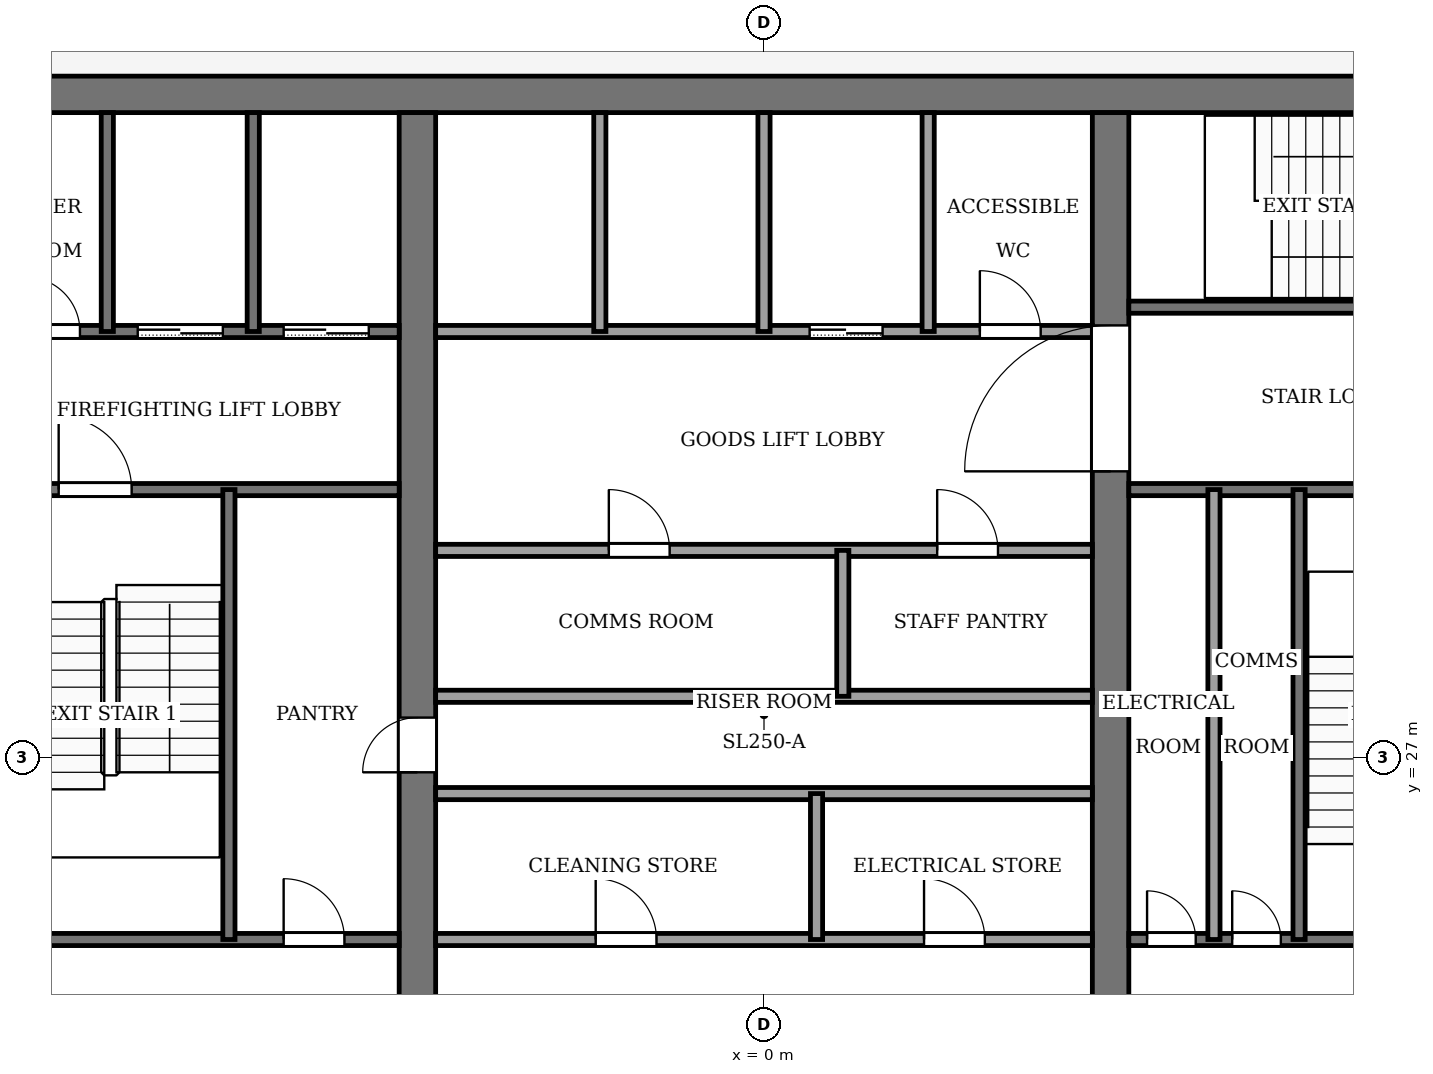
"""IFC4 building model, lengths in metres.
Left out: names, types, materials, properties, quantities, classifications, styles, units other than length and angle.
Written with IfcOpenShell. Run it as: python <this file> out.ifc"""

import sys

from ifc_helpers import new_model, si_unit, direction, frame, frame_2d, origin, place, context, subcontext, project, spatial, rectangle, extrude, element, fill, save


model = new_model("IFC4")
c1 = context("Model", 3, precision=1e-05, world=origin(), true_north=direction((0.0, 1.0)))
c2 = subcontext(c1, "Body", "Model", "MODEL_VIEW")
j1 = project(units=[si_unit("LENGTHUNIT", "METRE"), si_unit("PLANEANGLEUNIT", "RADIAN")], contexts=[c1])
p1 = place(None, origin())
s1 = spatial("IfcSite", under=j1, at=p1, CompositionType="ELEMENT")
p2 = place(p1, origin())
s2 = spatial("IfcBuilding", under=s1, at=p2, CompositionType="ELEMENT")
p3 = place(p2, frame((0.0, 0.0, 294.0)))
s3 = spatial("IfcBuildingStorey", under=s2, at=p3, CompositionType="ELEMENT", Elevation=294.0)
p4 = place(p3, frame((-13.2, 37.9, -0.13), z_axis=(0.0, 0.0, 1.0), x_axis=(1.0, 0.0, 0.0)))
e1 = element("IfcWall", 1, at=p4, inside=s3, PredefinedType="SHEAR", context=c2, shape_type="SweptSolid", body=[
    extrude(rectangle(XDim=26.4, YDim=0.6, at=frame_2d((13.2, 0.0))), origin(), (0.0, 0.0, 1.0), 4.0),
])
p5 = place(p3, frame((-5.7, 18.4, -0.13), z_axis=(0.0, 0.0, 1.0), x_axis=(0.0, 1.0, 0.0)))
e2 = element("IfcWall", 2, at=p5, inside=s3, PredefinedType="SHEAR", context=c2, shape_type="SweptSolid", body=[
    extrude(rectangle(XDim=19.2, YDim=0.6, at=frame_2d((9.6, 0.0))), origin(), (0.0, 0.0, 1.0), 4.0),
])
p6 = place(p5, frame((8.35, 0.0, 0.13)))
e3 = element("IfcOpeningElement", 3, at=p6, cuts=e2, PredefinedType="OPENING", context=c2, shape_type="SweptSolid", body=[
    extrude(rectangle(XDim=0.9, YDim=2.1, at=frame_2d((0.45, 1.05))), frame((0.0, 0.31, 0.0), z_axis=(0.0, -1.0, 0.0), x_axis=(1.0, 0.0, 0.0)), (0.0, 0.0, 1.0), 0.62),
])
p7 = place(p3, frame((5.7, 18.4, -0.13), z_axis=(0.0, 0.0, 1.0), x_axis=(0.0, 1.0, 0.0)))
e4 = element("IfcWall", 4, at=p7, inside=s3, PredefinedType="SHEAR", context=c2, shape_type="SweptSolid", body=[
    extrude(rectangle(XDim=19.2, YDim=0.6, at=frame_2d((9.6, 0.0))), origin(), (0.0, 0.0, 1.0), 4.0),
])
p8 = place(p7, frame((13.3, 0.0, 0.13)))
e5 = element("IfcOpeningElement", 5, at=p8, cuts=e4, PredefinedType="OPENING", context=c2, shape_type="SweptSolid", body=[
    extrude(rectangle(XDim=2.4, YDim=2.4, at=frame_2d((1.2, 1.2))), frame((0.0, 0.31, 0.0), z_axis=(0.0, -1.0, 0.0), x_axis=(1.0, 0.0, 0.0)), (0.0, 0.0, 1.0), 0.62),
])
p9 = place(p3, frame((-12.6, 24.0, 0.0), z_axis=(0.0, 0.0, 1.0), x_axis=(1.0, 0.0, 0.0)))
e6 = element("IfcWall", 6, at=p9, inside=s3, PredefinedType="PARTITIONING", context=c2, shape_type="SweptSolid", body=[
    extrude(rectangle(XDim=6.6, YDim=0.2, at=frame_2d((3.3, 0.0))), origin(), (0.0, 0.0, 1.0), 3.87),
])
p10 = place(p9, frame((4.7, 0.0, 0.0)))
e7 = element("IfcOpeningElement", 7, at=p10, cuts=e6, PredefinedType="OPENING", context=c2, shape_type="SweptSolid", body=[
    extrude(rectangle(XDim=1.0, YDim=2.1, at=frame_2d((0.5, 1.05))), frame((0.0, 0.11, 0.0), z_axis=(0.0, -1.0, 0.0), x_axis=(1.0, 0.0, 0.0)), (0.0, 0.0, 1.0), 0.22),
])
p11 = place(p3, frame((-5.4, 24.0, 0.0), z_axis=(0.0, 0.0, 1.0), x_axis=(1.0, 0.0, 0.0)))
e8 = element("IfcWall", 8, at=p11, inside=s3, PredefinedType="PARTITIONING", context=c2, shape_type="SweptSolid", body=[
    extrude(rectangle(XDim=10.8, YDim=0.2, at=frame_2d((5.4, 0.0))), origin(), (0.0, 0.0, 1.0), 3.87),
])
p12 = place(p11, frame((2.632, 0.0, 0.0)))
e9 = element("IfcOpeningElement", 9, at=p12, cuts=e8, PredefinedType="OPENING", context=c2, shape_type="SweptSolid", body=[
    extrude(rectangle(XDim=1.0, YDim=2.1, at=frame_2d((0.5, 1.05))), frame((0.0, 0.11, 0.0), z_axis=(0.0, -1.0, 0.0), x_axis=(1.0, 0.0, 0.0)), (0.0, 0.0, 1.0), 0.22),
])
p13 = place(p11, frame((8.032, 0.0, 0.0)))
e10 = element("IfcOpeningElement", 10, at=p13, cuts=e8, PredefinedType="OPENING", context=c2, shape_type="SweptSolid", body=[
    extrude(rectangle(XDim=1.0, YDim=2.1, at=frame_2d((0.5, 1.05))), frame((0.0, 0.11, 0.0), z_axis=(0.0, -1.0, 0.0), x_axis=(1.0, 0.0, 0.0)), (0.0, 0.0, 1.0), 0.22),
])
p14 = place(p3, frame((6.0, 24.0, 0.0), z_axis=(0.0, 0.0, 1.0), x_axis=(1.0, 0.0, 0.0)))
e11 = element("IfcWall", 11, at=p14, inside=s3, PredefinedType="PARTITIONING", context=c2, shape_type="SweptSolid", body=[
    extrude(rectangle(XDim=6.6, YDim=0.2, at=frame_2d((3.3, 0.0))), origin(), (0.0, 0.0, 1.0), 3.87),
])
p15 = place(p14, frame((0.3, 0.0, 0.0)))
e12 = element("IfcOpeningElement", 12, at=p15, cuts=e11, PredefinedType="OPENING", context=c2, shape_type="SweptSolid", body=[
    extrude(rectangle(XDim=0.8, YDim=2.1, at=frame_2d((0.4, 1.05))), frame((0.0, 0.11, 0.0), z_axis=(0.0, -1.0, 0.0), x_axis=(1.0, 0.0, 0.0)), (0.0, 0.0, 1.0), 0.22),
])
p16 = place(p14, frame((1.7, 0.0, 0.0)))
e13 = element("IfcOpeningElement", 13, at=p16, cuts=e11, PredefinedType="OPENING", context=c2, shape_type="SweptSolid", body=[
    extrude(rectangle(XDim=0.8, YDim=2.1, at=frame_2d((0.4, 1.05))), frame((0.0, 0.11, 0.0), z_axis=(0.0, -1.0, 0.0), x_axis=(1.0, 0.0, 0.0)), (0.0, 0.0, 1.0), 0.22),
])
p17 = place(p14, frame((4.4, 0.0, 0.0)))
e14 = element("IfcOpeningElement", 14, at=p17, cuts=e11, PredefinedType="OPENING", context=c2, shape_type="SweptSolid", body=[
    extrude(rectangle(XDim=1.2, YDim=2.2, at=frame_2d((0.6, 1.1))), frame((0.0, 0.11, 0.0), z_axis=(0.0, -1.0, 0.0), x_axis=(1.0, 0.0, 0.0)), (0.0, 0.0, 1.0), 0.22),
])
for number, where, z_axis, x_axis in (
    (15, (-5.4, 26.4, 0.0), (0.0, 0.0, 1.0), (1.0, 0.0, 0.0)),
    (16, (-5.4, 28.0, 0.0), (0.0, 0.0, 1.0), (1.0, 0.0, 0.0)),
):
    element("IfcWall", number, at=place(p3, frame(where, z_axis=z_axis, x_axis=x_axis)), inside=s3, PredefinedType="PARTITIONING", context=c2, shape_type="SweptSolid", body=[
        extrude(rectangle(XDim=10.8, YDim=0.2, at=frame_2d((5.4, 0.0))), origin(), (0.0, 0.0, 1.0), 3.87),
    ])
p18 = place(p3, frame((-5.4, 30.4, 0.0), z_axis=(0.0, 0.0, 1.0), x_axis=(1.0, 0.0, 0.0)))
e17 = element("IfcWall", 17, at=p18, inside=s3, PredefinedType="PARTITIONING", context=c2, shape_type="SweptSolid", body=[
    extrude(rectangle(XDim=10.8, YDim=0.2, at=frame_2d((5.4, 0.0))), origin(), (0.0, 0.0, 1.0), 3.87),
])
p19 = place(p18, frame((2.848, 0.0, 0.0)))
e18 = element("IfcOpeningElement", 18, at=p19, cuts=e17, PredefinedType="OPENING", context=c2, shape_type="SweptSolid", body=[
    extrude(rectangle(XDim=1.0, YDim=2.1, at=frame_2d((0.5, 1.05))), frame((0.0, 0.11, 0.0), z_axis=(0.0, -1.0, 0.0), x_axis=(1.0, 0.0, 0.0)), (0.0, 0.0, 1.0), 0.22),
])
p20 = place(p18, frame((8.248, 0.0, 0.0)))
e19 = element("IfcOpeningElement", 19, at=p20, cuts=e17, PredefinedType="OPENING", context=c2, shape_type="SweptSolid", body=[
    extrude(rectangle(XDim=1.0, YDim=2.1, at=frame_2d((0.5, 1.05))), frame((0.0, 0.11, 0.0), z_axis=(0.0, -1.0, 0.0), x_axis=(1.0, 0.0, 0.0)), (0.0, 0.0, 1.0), 0.22),
])
p21 = place(p3, frame((-12.6, 31.4, 0.0), z_axis=(0.0, 0.0, 1.0), x_axis=(1.0, 0.0, 0.0)))
e20 = element("IfcWall", 20, at=p21, inside=s3, PredefinedType="PARTITIONING", context=c2, shape_type="SweptSolid", body=[
    extrude(rectangle(XDim=6.6, YDim=0.2, at=frame_2d((3.3, 0.0))), origin(), (0.0, 0.0, 1.0), 3.87),
])
p22 = place(p21, frame((1.0, 0.0, 0.0)))
e21 = element("IfcOpeningElement", 21, at=p22, cuts=e20, PredefinedType="OPENING", context=c2, shape_type="SweptSolid", body=[
    extrude(rectangle(XDim=1.2, YDim=2.2, at=frame_2d((0.6, 1.1))), frame((0.0, 0.11, 0.0), z_axis=(0.0, -1.0, 0.0), x_axis=(1.0, 0.0, 0.0)), (0.0, 0.0, 1.0), 0.22),
])
p23 = place(p3, frame((6.0, 31.4, 0.0), z_axis=(0.0, 0.0, 1.0), x_axis=(1.0, 0.0, 0.0)))
e22 = element("IfcWall", 22, at=p23, inside=s3, PredefinedType="PARTITIONING", context=c2, shape_type="SweptSolid", body=[
    extrude(rectangle(XDim=6.6, YDim=0.2, at=frame_2d((3.3, 0.0))), origin(), (0.0, 0.0, 1.0), 3.87),
])
p24 = place(p3, frame((-12.6, 34.0, 0.0), z_axis=(0.0, 0.0, 1.0), x_axis=(1.0, 0.0, 0.0)))
e23 = element("IfcWall", 23, at=p24, inside=s3, PredefinedType="PARTITIONING", context=c2, shape_type="SweptSolid", body=[
    extrude(rectangle(XDim=6.6, YDim=0.2, at=frame_2d((3.3, 0.0))), origin(), (0.0, 0.0, 1.0), 3.87),
])
p25 = place(p24, frame((4.7, 0.0, 0.0)))
e24 = element("IfcOpeningElement", 24, at=p25, cuts=e23, PredefinedType="OPENING", context=c2, shape_type="SweptSolid", body=[
    extrude(rectangle(XDim=1.4, YDim=2.2, at=frame_2d((0.7, 1.1))), frame((0.0, 0.11, 0.0), z_axis=(0.0, -1.0, 0.0), x_axis=(1.0, 0.0, 0.0)), (0.0, 0.0, 1.0), 0.22),
])
p26 = place(p24, frame((2.3, 0.0, 0.0)))
e25 = element("IfcOpeningElement", 25, at=p26, cuts=e23, PredefinedType="OPENING", context=c2, shape_type="SweptSolid", body=[
    extrude(rectangle(XDim=1.4, YDim=2.2, at=frame_2d((0.7, 1.1))), frame((0.0, 0.11, 0.0), z_axis=(0.0, -1.0, 0.0), x_axis=(1.0, 0.0, 0.0)), (0.0, 0.0, 1.0), 0.22),
])
p27 = place(p24, frame((0.45, 0.0, 0.0)))
e26 = element("IfcOpeningElement", 26, at=p27, cuts=e23, PredefinedType="OPENING", context=c2, shape_type="SweptSolid", body=[
    extrude(rectangle(XDim=0.9, YDim=2.1, at=frame_2d((0.45, 1.05))), frame((0.0, 0.11, 0.0), z_axis=(0.0, -1.0, 0.0), x_axis=(1.0, 0.0, 0.0)), (0.0, 0.0, 1.0), 0.22),
])
p28 = place(p3, frame((-5.4, 34.0, 0.0), z_axis=(0.0, 0.0, 1.0), x_axis=(1.0, 0.0, 0.0)))
e27 = element("IfcWall", 27, at=p28, inside=s3, PredefinedType="PARTITIONING", context=c2, shape_type="SweptSolid", body=[
    extrude(rectangle(XDim=10.8, YDim=0.2, at=frame_2d((5.4, 0.0))), origin(), (0.0, 0.0, 1.0), 3.87),
])
p29 = place(p28, frame((6.15, 0.0, 0.0)))
e28 = element("IfcOpeningElement", 28, at=p29, cuts=e27, PredefinedType="OPENING", context=c2, shape_type="SweptSolid", body=[
    extrude(rectangle(XDim=1.2, YDim=2.2, at=frame_2d((0.6, 1.1))), frame((0.0, 0.11, 0.0), z_axis=(0.0, -1.0, 0.0), x_axis=(1.0, 0.0, 0.0)), (0.0, 0.0, 1.0), 0.22),
])
p30 = place(p28, frame((8.95, 0.0, 0.0)))
e29 = element("IfcOpeningElement", 29, at=p30, cuts=e27, PredefinedType="OPENING", context=c2, shape_type="SweptSolid", body=[
    extrude(rectangle(XDim=1.0, YDim=2.1, at=frame_2d((0.5, 1.05))), frame((0.0, 0.11, 0.0), z_axis=(0.0, -1.0, 0.0), x_axis=(1.0, 0.0, 0.0)), (0.0, 0.0, 1.0), 0.22),
])
p31 = place(p3, frame((6.0, 34.4, 0.0), z_axis=(0.0, 0.0, 1.0), x_axis=(1.0, 0.0, 0.0)))
e30 = element("IfcWall", 30, at=p31, inside=s3, PredefinedType="PARTITIONING", context=c2, shape_type="SweptSolid", body=[
    extrude(rectangle(XDim=6.6, YDim=0.2, at=frame_2d((3.3, 0.0))), origin(), (0.0, 0.0, 1.0), 3.87),
])
p32 = place(p31, frame((4.8, 0.0, 0.0)))
e31 = element("IfcOpeningElement", 31, at=p32, cuts=e30, PredefinedType="OPENING", context=c2, shape_type="SweptSolid", body=[
    extrude(rectangle(XDim=1.2, YDim=2.2, at=frame_2d((0.6, 1.1))), frame((0.0, 0.11, 0.0), z_axis=(0.0, -1.0, 0.0), x_axis=(1.0, 0.0, 0.0)), (0.0, 0.0, 1.0), 0.22),
])
p33 = place(p3, frame((-10.8, 34.0, 0.0), z_axis=(0.0, 0.0, 1.0), x_axis=(0.0, 1.0, 0.0)))
e32 = element("IfcWall", 32, at=p33, inside=s3, PredefinedType="PARTITIONING", context=c2, shape_type="SweptSolid", body=[
    extrude(rectangle(XDim=3.6, YDim=0.2, at=frame_2d((1.8, 0.0))), origin(), (0.0, 0.0, 1.0), 3.87),
])
p34 = place(p3, frame((-8.8, 24.0, 0.0), z_axis=(0.0, 0.0, 1.0), x_axis=(0.0, 1.0, 0.0)))
e33 = element("IfcWall", 33, at=p34, inside=s3, PredefinedType="PARTITIONING", context=c2, shape_type="SweptSolid", body=[
    extrude(rectangle(XDim=7.4, YDim=0.2, at=frame_2d((3.7, 0.0))), origin(), (0.0, 0.0, 1.0), 3.87),
])
for number, where, z_axis, x_axis in (
    (34, (-8.4, 34.0, 0.0), (0.0, 0.0, 1.0), (0.0, 1.0, 0.0)),
    (35, (-2.7, 34.0, 0.0), (0.0, 0.0, 1.0), (0.0, 1.0, 0.0)),
    (36, (0.0, 34.0, 0.0), (0.0, 0.0, 1.0), (0.0, 1.0, 0.0)),
):
    element("IfcWall", number, at=place(p3, frame(where, z_axis=z_axis, x_axis=x_axis)), inside=s3, PredefinedType="PARTITIONING", context=c2, shape_type="SweptSolid", body=[
        extrude(rectangle(XDim=3.6, YDim=0.2, at=frame_2d((1.8, 0.0))), origin(), (0.0, 0.0, 1.0), 3.87),
    ])
for number, where, z_axis, x_axis in (
    (37, (0.864, 24.0, 0.0), (0.0, 0.0, 1.0), (0.0, 1.0, 0.0)),
    (38, (1.296, 28.0, 0.0), (0.0, 0.0, 1.0), (0.0, 1.0, 0.0)),
):
    element("IfcWall", number, at=place(p3, frame(where, z_axis=z_axis, x_axis=x_axis)), inside=s3, PredefinedType="PARTITIONING", context=c2, shape_type="SweptSolid", body=[
        extrude(rectangle(XDim=2.4, YDim=0.2, at=frame_2d((1.2, 0.0))), origin(), (0.0, 0.0, 1.0), 3.87),
    ])
p35 = place(p3, frame((2.7, 34.0, 0.0), z_axis=(0.0, 0.0, 1.0), x_axis=(0.0, 1.0, 0.0)))
e39 = element("IfcWall", 39, at=p35, inside=s3, PredefinedType="PARTITIONING", context=c2, shape_type="SweptSolid", body=[
    extrude(rectangle(XDim=3.6, YDim=0.2, at=frame_2d((1.8, 0.0))), origin(), (0.0, 0.0, 1.0), 3.87),
])
for number, where, z_axis, x_axis in (
    (40, (7.4, 24.0, 0.0), (0.0, 0.0, 1.0), (0.0, 1.0, 0.0)),
    (41, (8.8, 24.0, 0.0), (0.0, 0.0, 1.0), (0.0, 1.0, 0.0)),
):
    element("IfcWall", number, at=place(p3, frame(where, z_axis=z_axis, x_axis=x_axis)), inside=s3, PredefinedType="PARTITIONING", context=c2, shape_type="SweptSolid", body=[
        extrude(rectangle(XDim=7.4, YDim=0.2, at=frame_2d((3.7, 0.0))), origin(), (0.0, 0.0, 1.0), 3.87),
    ])
p36 = place(p29, origin())
e42 = element("IfcDoor", 42, at=p36, inside=s3, OperationType="SLIDING_TO_LEFT", PredefinedType="DOOR", context=c2, shape_type="SweptSolid", body=[
    extrude(rectangle(XDim=1.2, YDim=2.2, at=frame_2d((0.6, 1.1))), frame((0.0, 0.025, 0.0), z_axis=(0.0, -1.0, 0.0), x_axis=(1.0, 0.0, 0.0)), (0.0, 0.0, 1.0), 0.05),
])
fill(e28, e42)
p37 = place(p25, origin())
e43 = element("IfcDoor", 43, at=p37, inside=s3, OperationType="SLIDING_TO_LEFT", PredefinedType="DOOR", context=c2, shape_type="SweptSolid", body=[
    extrude(rectangle(XDim=1.4, YDim=2.2, at=frame_2d((0.7, 1.1))), frame((0.0, 0.025, 0.0), z_axis=(0.0, -1.0, 0.0), x_axis=(1.0, 0.0, 0.0)), (0.0, 0.0, 1.0), 0.05),
])
fill(e24, e43)
p38 = place(p26, origin())
e44 = element("IfcDoor", 44, at=p38, inside=s3, OperationType="SLIDING_TO_LEFT", PredefinedType="DOOR", context=c2, shape_type="SweptSolid", body=[
    extrude(rectangle(XDim=1.4, YDim=2.2, at=frame_2d((0.7, 1.1))), frame((0.0, 0.025, 0.0), z_axis=(0.0, -1.0, 0.0), x_axis=(1.0, 0.0, 0.0)), (0.0, 0.0, 1.0), 0.05),
])
fill(e25, e44)
p39 = place(p27, origin())
e45 = element("IfcDoor", 45, at=p39, inside=s3, OperationType="SINGLE_SWING_RIGHT", PredefinedType="DOOR", context=c2, shape_type="SweptSolid", body=[
    extrude(rectangle(XDim=0.9, YDim=2.1, at=frame_2d((0.45, 1.05))), frame((0.0, 0.025, 0.0), z_axis=(0.0, -1.0, 0.0), x_axis=(1.0, 0.0, 0.0)), (0.0, 0.0, 1.0), 0.05),
])
fill(e26, e45)
p40 = place(p12, origin())
e46 = element("IfcDoor", 46, at=p40, inside=s3, OperationType="SINGLE_SWING_LEFT", PredefinedType="DOOR", context=c2, shape_type="SweptSolid", body=[
    extrude(rectangle(XDim=1.0, YDim=2.1, at=frame_2d((0.5, 1.05))), frame((0.0, 0.025, 0.0), z_axis=(0.0, -1.0, 0.0), x_axis=(1.0, 0.0, 0.0)), (0.0, 0.0, 1.0), 0.05),
])
fill(e9, e46)
p41 = place(p13, origin())
e47 = element("IfcDoor", 47, at=p41, inside=s3, OperationType="SINGLE_SWING_RIGHT", PredefinedType="DOOR", context=c2, shape_type="SweptSolid", body=[
    extrude(rectangle(XDim=1.0, YDim=2.1, at=frame_2d((0.5, 1.05))), frame((0.0, 0.025, 0.0), z_axis=(0.0, -1.0, 0.0), x_axis=(1.0, 0.0, 0.0)), (0.0, 0.0, 1.0), 0.05),
])
fill(e10, e47)
p42 = place(p19, origin())
e48 = element("IfcDoor", 48, at=p42, inside=s3, OperationType="SINGLE_SWING_LEFT", PredefinedType="DOOR", context=c2, shape_type="SweptSolid", body=[
    extrude(rectangle(XDim=1.0, YDim=2.1, at=frame_2d((0.5, 1.05))), frame((0.0, 0.025, 0.0), z_axis=(0.0, -1.0, 0.0), x_axis=(1.0, 0.0, 0.0)), (0.0, 0.0, 1.0), 0.05),
])
fill(e18, e48)
p43 = place(p20, origin())
e49 = element("IfcDoor", 49, at=p43, inside=s3, OperationType="SINGLE_SWING_RIGHT", PredefinedType="DOOR", context=c2, shape_type="SweptSolid", body=[
    extrude(rectangle(XDim=1.0, YDim=2.1, at=frame_2d((0.5, 1.05))), frame((0.0, 0.025, 0.0), z_axis=(0.0, -1.0, 0.0), x_axis=(1.0, 0.0, 0.0)), (0.0, 0.0, 1.0), 0.05),
])
fill(e19, e49)
p44 = place(p10, origin())
e50 = element("IfcDoor", 50, at=p44, inside=s3, OperationType="SINGLE_SWING_RIGHT", PredefinedType="DOOR", context=c2, shape_type="SweptSolid", body=[
    extrude(rectangle(XDim=1.0, YDim=2.1, at=frame_2d((0.5, 1.05))), frame((0.0, 0.025, 0.0), z_axis=(0.0, -1.0, 0.0), x_axis=(1.0, 0.0, 0.0)), (0.0, 0.0, 1.0), 0.05),
])
fill(e7, e50)
p45 = place(p15, origin())
e51 = element("IfcDoor", 51, at=p45, inside=s3, OperationType="SINGLE_SWING_RIGHT", PredefinedType="DOOR", context=c2, shape_type="SweptSolid", body=[
    extrude(rectangle(XDim=0.8, YDim=2.1, at=frame_2d((0.4, 1.05))), frame((0.0, 0.025, 0.0), z_axis=(0.0, -1.0, 0.0), x_axis=(1.0, 0.0, 0.0)), (0.0, 0.0, 1.0), 0.05),
])
fill(e12, e51)
p46 = place(p16, origin())
e52 = element("IfcDoor", 52, at=p46, inside=s3, OperationType="SINGLE_SWING_LEFT", PredefinedType="DOOR", context=c2, shape_type="SweptSolid", body=[
    extrude(rectangle(XDim=0.8, YDim=2.1, at=frame_2d((0.4, 1.05))), frame((0.0, 0.025, 0.0), z_axis=(0.0, -1.0, 0.0), x_axis=(1.0, 0.0, 0.0)), (0.0, 0.0, 1.0), 0.05),
])
fill(e13, e52)
p47 = place(p30, origin())
e53 = element("IfcDoor", 53, at=p47, inside=s3, OperationType="SINGLE_SWING_LEFT", PredefinedType="DOOR", context=c2, shape_type="SweptSolid", body=[
    extrude(rectangle(XDim=1.0, YDim=2.1, at=frame_2d((0.5, 1.05))), frame((0.0, 0.025, 0.0), z_axis=(0.0, -1.0, 0.0), x_axis=(1.0, 0.0, 0.0)), (0.0, 0.0, 1.0), 0.05),
])
fill(e29, e53)
p48 = place(p6, origin())
e54 = element("IfcDoor", 54, at=p48, inside=s3, OperationType="SINGLE_SWING_LEFT", PredefinedType="DOOR", context=c2, shape_type="SweptSolid", body=[
    extrude(rectangle(XDim=0.9, YDim=2.1, at=frame_2d((0.45, 1.05))), frame((0.0, 0.025, 0.0), z_axis=(0.0, -1.0, 0.0), x_axis=(1.0, 0.0, 0.0)), (0.0, 0.0, 1.0), 0.05),
])
fill(e3, e54)
p49 = place(p22, origin())
e55 = element("IfcDoor", 55, at=p49, inside=s3, OperationType="SINGLE_SWING_LEFT", PredefinedType="DOOR", context=c2, shape_type="SweptSolid", body=[
    extrude(rectangle(XDim=1.2, YDim=2.2, at=frame_2d((0.6, 1.1))), frame((0.0, 0.025, 0.0), z_axis=(0.0, -1.0, 0.0), x_axis=(1.0, 0.0, 0.0)), (0.0, 0.0, 1.0), 0.05),
])
fill(e21, e55)
p50 = place(p8, origin())
e56 = element("IfcDoor", 56, at=p50, inside=s3, OperationType="DOUBLE_DOOR_SINGLE_SWING", PredefinedType="DOOR", context=c2, shape_type="SweptSolid", body=[
    extrude(rectangle(XDim=2.4, YDim=2.4, at=frame_2d((1.2, 1.2))), frame((0.0, 0.025, 0.0), z_axis=(0.0, -1.0, 0.0), x_axis=(1.0, 0.0, 0.0)), (0.0, 0.0, 1.0), 0.05),
])
fill(e5, e56)
save(model, sys.argv[1])
